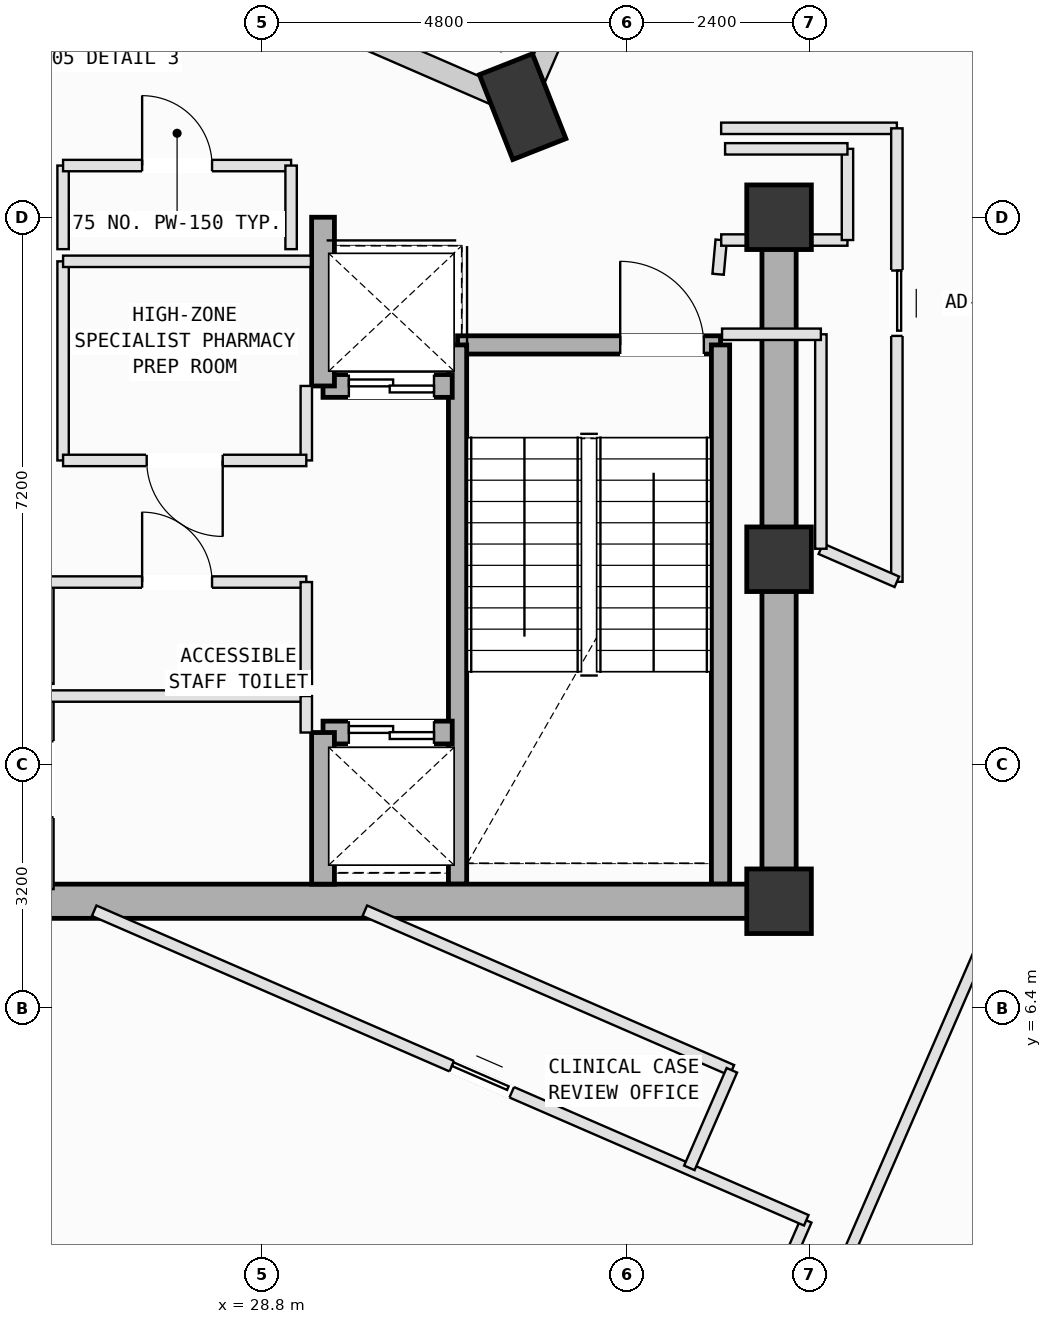
"""IFC4 building model, lengths in metres.
Left out: names, types, materials, properties, quantities, classifications, styles, units other than length and angle.
Written with IfcOpenShell. Run it as: python <this file> out.ifc"""

import sys

from ifc_helpers import new_model, si_unit, direction, frame, frame_2d, origin, origin_2d, place, context, subcontext, project, spatial, rectangle, extrude, element, fill, save


model = new_model("IFC4")
c1 = context("Model", 3, precision=1e-05, world=origin(), true_north=direction((0.0, 1.0)))
c2 = subcontext(c1, "Body", "Model", "MODEL_VIEW")
j1 = project(units=[si_unit("LENGTHUNIT", "METRE"), si_unit("PLANEANGLEUNIT", "RADIAN")], contexts=[c1])
p1 = place(None, origin())
s1 = spatial("IfcSite", under=j1, at=p1, CompositionType="ELEMENT")
p2 = place(p1, origin())
s2 = spatial("IfcBuilding", under=s1, at=p2, CompositionType="ELEMENT")
p3 = place(p2, frame((0.0, 0.0, 316.6)))
s3 = spatial("IfcBuildingStorey", under=s2, at=p3, CompositionType="ELEMENT", Elevation=316.6)
for number, where, z_axis, x_axis in (
    (1, (35.6, 7.8, 0.0), (0.0, 0.0, 1.0), (1.0, 0.0, 0.0)),
    (2, (35.6, 12.3, 0.0), (0.0, 0.0, 1.0), (1.0, 0.0, 0.0)),
    (3, (35.6, 16.8, 0.0), (0.0, 0.0, 1.0), (1.0, 0.0, 0.0)),
):
    element("IfcColumn", number, at=place(p3, frame(where, z_axis=z_axis, x_axis=x_axis)), inside=s3, PredefinedType="COLUMN", context=c2, shape_type="SweptSolid", body=[
        extrude(rectangle(XDim=0.85, YDim=0.85, at=origin_2d()), origin(), (0.0, 0.0, 1.0), 4.0),
    ])
p4 = place(p3, frame((32.226, 18.255, 0.002), z_axis=(0.0, 0.0, 1.0), x_axis=(-0.366501226724, 0.930417567982, 0.0)))
e4 = element("IfcColumn", 4, at=p4, inside=s3, PredefinedType="COLUMN", context=c2, shape_type="SweptSolid", body=[
    extrude(rectangle(XDim=1.2, YDim=0.75, at=origin_2d()), origin(), (0.0, 0.0, 1.0), 3.996),
])
p5 = place(p3, frame((32.385, 18.619, 0.0), z_axis=(0.0, 0.0, 1.0), x_axis=(0.398753668733, 0.917058074318, 0.0)))
e5 = element("IfcWall", 5, at=p5, inside=s3, PredefinedType="SOLIDWALL", context=c2, shape_type="SweptSolid", body=[
    extrude(rectangle(XDim=6.155, YDim=0.28, at=frame_2d((3.078, 0.0))), origin(), (0.0, 0.0, 1.0), 3.265),
])
p6 = place(p3, frame((25.484, 21.187, 0.0), z_axis=(0.0, 0.0, 1.0), x_axis=(0.917060568388, -0.398747932794, 0.0)))
e6 = element("IfcWall", 6, at=p6, inside=s3, PredefinedType="SOLIDWALL", context=c2, shape_type="SweptSolid", body=[
    extrude(rectangle(XDim=6.955, YDim=0.28, at=frame_2d((3.478, 0.0))), origin(), (0.0, 0.0, 1.0), 2.765),
])
p7 = place(p3, frame((31.37, 15.12, 0.0), z_axis=(0.0, 0.0, 1.0), x_axis=(1.0, 0.0, 0.0)))
e7 = element("IfcWall", 7, at=p7, inside=s3, PredefinedType="SOLIDWALL", context=c2, shape_type="SweptSolid", body=[
    extrude(rectangle(XDim=3.46, YDim=0.24, at=frame_2d((1.73, 0.0))), origin(), (0.0, 0.0, 1.0), 3.78),
])
p8 = place(p7, frame((2.14, 0.0, 0.0)))
e8 = element("IfcOpeningElement", 8, at=p8, cuts=e7, PredefinedType="OPENING", context=c2, shape_type="SweptSolid", body=[
    extrude(rectangle(XDim=1.1, YDim=2.15, at=frame_2d((0.55, 1.075))), frame((0.0, 0.13, 0.0), z_axis=(0.0, -1.0, 0.0), x_axis=(1.0, 0.0, 0.0)), (0.0, 0.0, 1.0), 0.26),
])
for number, where, z_axis, x_axis in (
    (9, (34.83, 15.12, 0.0), (0.0, 0.0, 1.0), (0.0, -1.0, 0.0)),
    (10, (31.37, 8.025, 0.0), (0.0, 0.0, 1.0), (0.0, 1.0, 0.0)),
):
    element("IfcWall", number, at=place(p3, frame(where, z_axis=z_axis, x_axis=x_axis)), inside=s3, PredefinedType="SOLIDWALL", context=c2, shape_type="SweptSolid", body=[
        extrude(rectangle(XDim=7.095, YDim=0.24, at=frame_2d((3.548, 0.0))), origin(), (0.0, 0.0, 1.0), 3.78),
    ])
p9 = place(p3, frame((24.8, 7.8, 0.0), z_axis=(0.0, 0.0, 1.0), x_axis=(1.0, 0.0, 0.0)))
e11 = element("IfcWall", 11, at=p9, inside=s3, PredefinedType="SHEAR", context=c2, shape_type="SweptSolid", body=[
    extrude(rectangle(XDim=10.8, YDim=0.45, at=frame_2d((5.4, 0.0))), origin(), (0.0, 0.0, 1.0), 3.78),
])
p10 = place(p3, frame((35.6, 7.8, 0.0), z_axis=(0.0, 0.0, 1.0), x_axis=(0.0, 1.0, 0.0)))
e12 = element("IfcWall", 12, at=p10, inside=s3, PredefinedType="SHEAR", context=c2, shape_type="SweptSolid", body=[
    extrude(rectangle(XDim=9.0, YDim=0.45, at=frame_2d((4.5, 0.0))), origin(), (0.0, 0.0, 1.0), 3.78),
])
p11 = place(p3, frame((29.6, 10.02, 0.0), z_axis=(0.0, 0.0, 1.0), x_axis=(1.0, 0.0, 0.0)))
e13 = element("IfcWall", 13, at=p11, inside=s3, PredefinedType="SOLIDWALL", context=c2, shape_type="SweptSolid", body=[
    extrude(rectangle(XDim=1.7, YDim=0.3, at=frame_2d((0.85, 0.0))), origin(), (0.0, 0.0, 1.0), 3.78),
])
p12 = place(p11, frame((0.34, 0.0, 0.0)))
e14 = element("IfcOpeningElement", 14, at=p12, cuts=e13, PredefinedType="OPENING", context=c2, shape_type="SweptSolid", body=[
    extrude(rectangle(XDim=1.12, YDim=2.15, at=frame_2d((0.56, 1.075))), frame((0.0, 0.16, 0.0), z_axis=(0.0, -1.0, 0.0), x_axis=(1.0, 0.0, 0.0)), (0.0, 0.0, 1.0), 0.32),
])
p13 = place(p3, frame((29.6, 8.025, 0.0), z_axis=(0.0, 0.0, 1.0), x_axis=(0.0, 1.0, 0.0)))
e15 = element("IfcWall", 15, at=p13, inside=s3, PredefinedType="SOLIDWALL", context=c2, shape_type="SweptSolid", body=[
    extrude(rectangle(XDim=1.995, YDim=0.3, at=frame_2d((0.998, 0.0))), origin(), (0.0, 0.0, 1.0), 3.78),
])
p14 = place(p3, frame((29.6, 14.58, 0.0), z_axis=(0.0, 0.0, 1.0), x_axis=(1.0, 0.0, 0.0)))
e16 = element("IfcWall", 16, at=p14, inside=s3, PredefinedType="SOLIDWALL", context=c2, shape_type="SweptSolid", body=[
    extrude(rectangle(XDim=1.7, YDim=0.3, at=frame_2d((0.85, 0.0))), origin(), (0.0, 0.0, 1.0), 3.78),
])
p15 = place(p14, frame((0.34, 0.0, 0.0)))
e17 = element("IfcOpeningElement", 17, at=p15, cuts=e16, PredefinedType="OPENING", context=c2, shape_type="SweptSolid", body=[
    extrude(rectangle(XDim=1.12, YDim=2.15, at=frame_2d((0.56, 1.075))), frame((0.0, 0.16, 0.0), z_axis=(0.0, -1.0, 0.0), x_axis=(1.0, 0.0, 0.0)), (0.0, 0.0, 1.0), 0.32),
])
p16 = place(p3, frame((29.6, 14.58, 0.0), z_axis=(0.0, 0.0, 1.0), x_axis=(0.0, 1.0, 0.0)))
e18 = element("IfcWall", 18, at=p16, inside=s3, PredefinedType="SOLIDWALL", context=c2, shape_type="SweptSolid", body=[
    extrude(rectangle(XDim=2.22, YDim=0.3, at=frame_2d((1.11, 0.0))), origin(), (0.0, 0.0, 1.0), 3.78),
])
p17 = place(p3, frame((25.98, 7.96, 0.0), z_axis=(0.0, 0.0, 1.0), x_axis=(0.0, 1.0, 0.0)))
e19 = element("IfcWall", 19, at=p17, inside=s3, PredefinedType="PARTITIONING", context=c2, shape_type="SweptSolid", body=[
    extrude(rectangle(XDim=2.54, YDim=0.15, at=frame_2d((1.27, 0.0))), origin(), (0.0, 0.0, 1.0), 3.78),
])
p18 = place(p17, frame((0.945, 0.0, 0.0)))
e20 = element("IfcOpeningElement", 20, at=p18, cuts=e19, PredefinedType="OPENING", context=c2, shape_type="SweptSolid", body=[
    extrude(rectangle(XDim=1.0, YDim=2.12, at=frame_2d((0.5, 1.06))), frame((0.0, 0.085, 0.0), z_axis=(0.0, -1.0, 0.0), x_axis=(1.0, 0.0, 0.0)), (0.0, 0.0, 1.0), 0.17),
])
p19 = place(p3, frame((25.98, 10.5, 0.0), z_axis=(0.0, 0.0, 1.0), x_axis=(1.0, 0.0, 0.0)))
e21 = element("IfcWall", 21, at=p19, inside=s3, PredefinedType="PARTITIONING", context=c2, shape_type="SweptSolid", body=[
    extrude(rectangle(XDim=3.4, YDim=0.15, at=frame_2d((1.7, 0.0))), origin(), (0.0, 0.0, 1.0), 3.78),
])
p20 = place(p3, frame((29.38, 10.5, 0.0), z_axis=(0.0, 0.0, 1.0), x_axis=(0.0, -1.0, 0.0)))
e22 = element("IfcWall", 22, at=p20, inside=s3, PredefinedType="PARTITIONING", context=c2, shape_type="SweptSolid", body=[
    extrude(rectangle(XDim=0.48, YDim=0.15, at=frame_2d((0.24, 0.0))), origin(), (0.0, 0.0, 1.0), 3.78),
])
p21 = place(p3, frame((25.98, 10.66, 0.0), z_axis=(0.0, 0.0, 1.0), x_axis=(0.0, 1.0, 0.0)))
e23 = element("IfcWall", 23, at=p21, inside=s3, PredefinedType="PARTITIONING", context=c2, shape_type="SweptSolid", body=[
    extrude(rectangle(XDim=1.34, YDim=0.15, at=frame_2d((0.67, 0.0))), origin(), (0.0, 0.0, 1.0), 3.78),
])
p22 = place(p3, frame((25.98, 12.0, 0.0), z_axis=(0.0, 0.0, 1.0), x_axis=(1.0, 0.0, 0.0)))
e24 = element("IfcWall", 24, at=p22, inside=s3, PredefinedType="PARTITIONING", context=c2, shape_type="SweptSolid", body=[
    extrude(rectangle(XDim=3.4, YDim=0.15, at=frame_2d((1.7, 0.0))), origin(), (0.0, 0.0, 1.0), 3.78),
])
p23 = place(p22, frame((1.24, 0.0, 0.0)))
e25 = element("IfcOpeningElement", 25, at=p23, cuts=e24, PredefinedType="OPENING", context=c2, shape_type="SweptSolid", body=[
    extrude(rectangle(XDim=0.92, YDim=2.1, at=frame_2d((0.46, 1.05))), frame((0.0, 0.085, 0.0), z_axis=(0.0, -1.0, 0.0), x_axis=(1.0, 0.0, 0.0)), (0.0, 0.0, 1.0), 0.17),
])
p24 = place(p3, frame((29.38, 12.0, 0.0), z_axis=(0.0, 0.0, 1.0), x_axis=(0.0, -1.0, 0.0)))
e26 = element("IfcWall", 26, at=p24, inside=s3, PredefinedType="PARTITIONING", context=c2, shape_type="SweptSolid", body=[
    extrude(rectangle(XDim=1.34, YDim=0.15, at=frame_2d((0.67, 0.0))), origin(), (0.0, 0.0, 1.0), 3.78),
])
p25 = place(p3, frame((26.18, 13.6, 0.0), z_axis=(0.0, 0.0, 1.0), x_axis=(0.0, 1.0, 0.0)))
e27 = element("IfcWall", 27, at=p25, inside=s3, PredefinedType="PARTITIONING", context=c2, shape_type="SweptSolid", body=[
    extrude(rectangle(XDim=2.62, YDim=0.15, at=frame_2d((1.31, 0.0))), origin(), (0.0, 0.0, 1.0), 3.78),
])
p26 = place(p3, frame((26.18, 16.22, 0.0), z_axis=(0.0, 0.0, 1.0), x_axis=(1.0, 0.0, 0.0)))
e28 = element("IfcWall", 28, at=p26, inside=s3, PredefinedType="PARTITIONING", context=c2, shape_type="SweptSolid", body=[
    extrude(rectangle(XDim=3.26, YDim=0.15, at=frame_2d((1.63, 0.0))), origin(), (0.0, 0.0, 1.0), 3.78),
])
p27 = place(p3, frame((29.38, 14.58, 0.0), z_axis=(0.0, 0.0, 1.0), x_axis=(0.0, -1.0, 0.0)))
e29 = element("IfcWall", 29, at=p27, inside=s3, PredefinedType="PARTITIONING", context=c2, shape_type="SweptSolid", body=[
    extrude(rectangle(XDim=0.98, YDim=0.15, at=frame_2d((0.49, 0.0))), origin(), (0.0, 0.0, 1.0), 3.78),
])
p28 = place(p3, frame((29.38, 13.6, 0.0), z_axis=(0.0, 0.0, 1.0), x_axis=(-1.0, 0.0, 0.0)))
e30 = element("IfcWall", 30, at=p28, inside=s3, PredefinedType="PARTITIONING", context=c2, shape_type="SweptSolid", body=[
    extrude(rectangle(XDim=3.2, YDim=0.15, at=frame_2d((1.6, 0.0))), origin(), (0.0, 0.0, 1.0), 3.78),
])
p29 = place(p28, frame((1.1, 0.0, 0.0)))
e31 = element("IfcOpeningElement", 31, at=p29, cuts=e30, PredefinedType="OPENING", context=c2, shape_type="SweptSolid", body=[
    extrude(rectangle(XDim=1.0, YDim=2.12, at=frame_2d((0.5, 1.06))), frame((0.0, 0.085, 0.0), z_axis=(0.0, -1.0, 0.0), x_axis=(1.0, 0.0, 0.0)), (0.0, 0.0, 1.0), 0.17),
])
p30 = place(p3, frame((26.18, 16.38, 0.0), z_axis=(0.0, 0.0, 1.0), x_axis=(0.0, 1.0, 0.0)))
e32 = element("IfcWall", 32, at=p30, inside=s3, PredefinedType="PARTITIONING", context=c2, shape_type="SweptSolid", body=[
    extrude(rectangle(XDim=1.1, YDim=0.15, at=frame_2d((0.55, 0.0))), origin(), (0.0, 0.0, 1.0), 3.78),
])
p31 = place(p3, frame((26.18, 17.48, 0.0), z_axis=(0.0, 0.0, 1.0), x_axis=(1.0, 0.0, 0.0)))
e33 = element("IfcWall", 33, at=p31, inside=s3, PredefinedType="PARTITIONING", context=c2, shape_type="SweptSolid", body=[
    extrude(rectangle(XDim=3.0, YDim=0.15, at=frame_2d((1.5, 0.0))), origin(), (0.0, 0.0, 1.0), 3.78),
])
p32 = place(p31, frame((1.04, 0.0, 0.0)))
e34 = element("IfcOpeningElement", 34, at=p32, cuts=e33, PredefinedType="OPENING", context=c2, shape_type="SweptSolid", body=[
    extrude(rectangle(XDim=0.92, YDim=2.1, at=frame_2d((0.46, 1.05))), frame((0.0, 0.085, 0.0), z_axis=(0.0, -1.0, 0.0), x_axis=(1.0, 0.0, 0.0)), (0.0, 0.0, 1.0), 0.17),
])
p33 = place(p3, frame((29.18, 17.48, 0.0), z_axis=(0.0, 0.0, 1.0), x_axis=(0.0, -1.0, 0.0)))
e35 = element("IfcWall", 35, at=p33, inside=s3, PredefinedType="PARTITIONING", context=c2, shape_type="SweptSolid", body=[
    extrude(rectangle(XDim=1.1, YDim=0.15, at=frame_2d((0.55, 0.0))), origin(), (0.0, 0.0, 1.0), 3.78),
])
p34 = place(p3, frame((33.286, -4.26, 0.0), z_axis=(0.0, 0.0, 1.0), x_axis=(0.398794571869, 0.9170402878, 0.0)))
e36 = element("IfcWall", 36, at=p34, inside=s3, PredefinedType="PARTITIONING", context=c2, shape_type="SweptSolid", body=[
    extrude(rectangle(XDim=13.04, YDim=0.15, at=frame_2d((6.52, 0.0))), origin(), (0.0, 0.0, 1.0), 2.765),
])
p35 = place(p3, frame((35.958, 3.602, 0.0), z_axis=(0.0, 0.0, 1.0), x_axis=(-0.398756424957, -0.917056875857, 0.0)))
e37 = element("IfcWall", 37, at=p35, inside=s3, PredefinedType="PARTITIONING", context=c2, shape_type="SweptSolid", body=[
    extrude(rectangle(XDim=8.835, YDim=0.15, at=frame_2d((4.417, 0.0))), origin(), (0.0, 0.0, 1.0), 2.765),
])
p36 = place(p3, frame((26.589, 7.675, 0.0), z_axis=(0.0, 0.0, 1.0), x_axis=(0.917085632944, -0.398690283112, 0.0)))
e38 = element("IfcWall", 38, at=p36, inside=s3, PredefinedType="PARTITIONING", context=c2, shape_type="SweptSolid", body=[
    extrude(rectangle(XDim=10.216, YDim=0.15, at=frame_2d((5.108, 0.0))), origin(), (0.0, 0.0, 1.0), 3.78),
])
p37 = place(p36, frame((5.131, 0.0, 0.0)))
e39 = element("IfcOpeningElement", 39, at=p37, cuts=e38, PredefinedType="OPENING", context=c2, shape_type="SweptSolid", body=[
    extrude(rectangle(XDim=0.86, YDim=2.06, at=frame_2d((0.43, 1.03))), frame((0.0, 0.085, 0.0), z_axis=(0.0, -1.0, 0.0), x_axis=(1.0, 0.0, 0.0)), (0.0, 0.0, 1.0), 0.17),
])
p38 = place(p3, frame((30.15, 7.675, 0.0), z_axis=(0.0, 0.0, 1.0), x_axis=(0.917103960726, -0.398648122059, 0.0)))
e40 = element("IfcWall", 40, at=p38, inside=s3, PredefinedType="PARTITIONING", context=c2, shape_type="SweptSolid", body=[
    extrude(rectangle(XDim=5.266, YDim=0.15, at=frame_2d((2.633, 0.0))), origin(), (0.0, 0.0, 1.0), 3.78),
])
p39 = place(p3, frame((34.979, 5.576, 0.0), z_axis=(0.0, 0.0, 1.0), x_axis=(-0.399236039494, -0.916848179782, 0.0)))
e41 = element("IfcWall", 41, at=p39, inside=s3, PredefinedType="PARTITIONING", context=c2, shape_type="SweptSolid", body=[
    extrude(rectangle(XDim=1.4, YDim=0.15, at=frame_2d((0.7, 0.0))), origin(), (0.0, 0.0, 1.0), 3.78),
])
p40 = place(p3, frame((34.798, 16.05, 0.0), z_axis=(0.0, 0.0, 1.0), x_axis=(0.090779345207, 0.99587103105, 0.0)))
e42 = element("IfcWall", 42, at=p40, inside=s3, PredefinedType="PARTITIONING", context=c2, shape_type="SweptSolid", body=[
    extrude(rectangle(XDim=0.452, YDim=0.15, at=frame_2d((0.226, 0.0))), origin(), (0.0, 0.0, 1.0), 3.78),
])
p41 = place(p3, frame((34.839, 16.5, 0.0), z_axis=(0.0, 0.0, 1.0), x_axis=(1.0, 0.0, 0.0)))
e43 = element("IfcWall", 43, at=p41, inside=s3, PredefinedType="PARTITIONING", context=c2, shape_type="SweptSolid", body=[
    extrude(rectangle(XDim=1.661, YDim=0.15, at=frame_2d((0.831, 0.0))), origin(), (0.0, 0.0, 1.0), 2.765),
])
p42 = place(p3, frame((36.5, 16.5, 0.0), z_axis=(0.0, 0.0, 1.0), x_axis=(0.0, 1.0, 0.0)))
e44 = element("IfcWall", 44, at=p42, inside=s3, PredefinedType="PARTITIONING", context=c2, shape_type="SweptSolid", body=[
    extrude(rectangle(XDim=1.2, YDim=0.15, at=frame_2d((0.6, 0.0))), origin(), (0.0, 0.0, 1.0), 3.78),
])
p43 = place(p3, frame((36.5, 17.7, 0.0), z_axis=(0.0, 0.0, 1.0), x_axis=(-1.0, 0.0, 0.0)))
e45 = element("IfcWall", 45, at=p43, inside=s3, PredefinedType="PARTITIONING", context=c2, shape_type="SweptSolid", body=[
    extrude(rectangle(XDim=1.61, YDim=0.15, at=frame_2d((0.805, 0.0))), origin(), (0.0, 0.0, 1.0), 3.78),
])
p44 = place(p3, frame((34.838, 17.97, 0.0), z_axis=(0.0, 0.0, 1.0), x_axis=(1.0, 0.0, 0.0)))
e46 = element("IfcWall", 46, at=p44, inside=s3, PredefinedType="PARTITIONING", context=c2, shape_type="SweptSolid", body=[
    extrude(rectangle(XDim=2.312, YDim=0.15, at=frame_2d((1.156, 0.0))), origin(), (0.0, 0.0, 1.0), 3.78),
])
p45 = place(p3, frame((37.15, 17.97, 0.0), z_axis=(0.0, 0.0, 1.0), x_axis=(0.0, -1.0, 0.0)))
e47 = element("IfcWall", 47, at=p45, inside=s3, PredefinedType="PARTITIONING", context=c2, shape_type="SweptSolid", body=[
    extrude(rectangle(XDim=5.967, YDim=0.15, at=frame_2d((2.983, 0.0))), origin(), (0.0, 0.0, 1.0), 3.78),
])
p46 = place(p45, frame((1.871, 0.0, 0.0)))
e48 = element("IfcOpeningElement", 48, at=p46, cuts=e47, PredefinedType="OPENING", context=c2, shape_type="SweptSolid", body=[
    extrude(rectangle(XDim=0.86, YDim=2.06, at=frame_2d((0.43, 1.03))), frame((0.0, 0.085, 0.0), z_axis=(0.0, -1.0, 0.0), x_axis=(1.0, 0.0, 0.0)), (0.0, 0.0, 1.0), 0.17),
])
p47 = place(p3, frame((37.15, 12.003, 0.0), z_axis=(0.0, 0.0, 1.0), x_axis=(-0.916977493273, 0.398938938724, 0.0)))
e49 = element("IfcWall", 49, at=p47, inside=s3, PredefinedType="PARTITIONING", context=c2, shape_type="SweptSolid", body=[
    extrude(rectangle(XDim=1.091, YDim=0.15, at=frame_2d((0.545, 0.0))), origin(), (0.0, 0.0, 1.0), 3.78),
])
p48 = place(p3, frame((36.15, 12.438, 0.0), z_axis=(0.0, 0.0, 1.0), x_axis=(0.0, 1.0, 0.0)))
e50 = element("IfcWall", 50, at=p48, inside=s3, PredefinedType="PARTITIONING", context=c2, shape_type="SweptSolid", body=[
    extrude(rectangle(XDim=2.822, YDim=0.15, at=frame_2d((1.411, 0.0))), origin(), (0.0, 0.0, 1.0), 3.78),
])
p49 = place(p3, frame((36.15, 15.26, 0.0), z_axis=(0.0, 0.0, 1.0), x_axis=(-1.0, 0.0, 0.0)))
e51 = element("IfcWall", 51, at=p49, inside=s3, PredefinedType="PARTITIONING", context=c2, shape_type="SweptSolid", body=[
    extrude(rectangle(XDim=1.3, YDim=0.15, at=frame_2d((0.65, 0.0))), origin(), (0.0, 0.0, 1.0), 3.78),
])
p50 = place(p8, origin())
e52 = element("IfcDoor", 52, at=p50, inside=s3, OperationType="SINGLE_SWING_LEFT", PredefinedType="DOOR", context=c2, shape_type="SweptSolid", body=[
    extrude(rectangle(XDim=1.1, YDim=2.15, at=frame_2d((0.55, 1.075))), frame((0.0, 0.025, 0.0), z_axis=(0.0, -1.0, 0.0), x_axis=(1.0, 0.0, 0.0)), (0.0, 0.0, 1.0), 0.05),
])
fill(e8, e52)
p51 = place(p12, origin())
e53 = element("IfcDoor", 53, at=p51, inside=s3, OperationType="DOUBLE_DOOR_SLIDING", PredefinedType="DOOR", context=c2, shape_type="SweptSolid", body=[
    extrude(rectangle(XDim=1.12, YDim=2.15, at=frame_2d((0.56, 1.075))), frame((0.0, 0.025, 0.0), z_axis=(0.0, -1.0, 0.0), x_axis=(1.0, 0.0, 0.0)), (0.0, 0.0, 1.0), 0.05),
])
fill(e14, e53)
p52 = place(p15, origin())
e54 = element("IfcDoor", 54, at=p52, inside=s3, OperationType="DOUBLE_DOOR_SLIDING", PredefinedType="DOOR", context=c2, shape_type="SweptSolid", body=[
    extrude(rectangle(XDim=1.12, YDim=2.15, at=frame_2d((0.56, 1.075))), frame((0.0, 0.025, 0.0), z_axis=(0.0, -1.0, 0.0), x_axis=(1.0, 0.0, 0.0)), (0.0, 0.0, 1.0), 0.05),
])
fill(e17, e54)
p53 = place(p23, origin())
e55 = element("IfcDoor", 55, at=p53, inside=s3, OperationType="SINGLE_SWING_LEFT", PredefinedType="DOOR", context=c2, shape_type="SweptSolid", body=[
    extrude(rectangle(XDim=0.92, YDim=2.1, at=frame_2d((0.46, 1.05))), frame((0.0, 0.025, 0.0), z_axis=(0.0, -1.0, 0.0), x_axis=(1.0, 0.0, 0.0)), (0.0, 0.0, 1.0), 0.05),
])
fill(e25, e55)
p54 = place(p29, origin())
e56 = element("IfcDoor", 56, at=p54, inside=s3, OperationType="SINGLE_SWING_LEFT", PredefinedType="DOOR", context=c2, shape_type="SweptSolid", body=[
    extrude(rectangle(XDim=1.0, YDim=2.12, at=frame_2d((0.5, 1.06))), frame((0.0, 0.025, 0.0), z_axis=(0.0, -1.0, 0.0), x_axis=(1.0, 0.0, 0.0)), (0.0, 0.0, 1.0), 0.05),
])
fill(e31, e56)
p55 = place(p32, origin())
e57 = element("IfcDoor", 57, at=p55, inside=s3, OperationType="SINGLE_SWING_LEFT", PredefinedType="DOOR", context=c2, shape_type="SweptSolid", body=[
    extrude(rectangle(XDim=0.92, YDim=2.1, at=frame_2d((0.46, 1.05))), frame((0.0, 0.025, 0.0), z_axis=(0.0, -1.0, 0.0), x_axis=(1.0, 0.0, 0.0)), (0.0, 0.0, 1.0), 0.05),
])
fill(e34, e57)
p56 = place(p46, origin())
e58 = element("IfcDoor", 58, at=p56, inside=s3, OperationType="SLIDING_TO_LEFT", PredefinedType="DOOR", context=c2, shape_type="SweptSolid", body=[
    extrude(rectangle(XDim=0.86, YDim=2.06, at=frame_2d((0.43, 1.03))), frame((0.0, 0.025, 0.0), z_axis=(0.0, -1.0, 0.0), x_axis=(1.0, 0.0, 0.0)), (0.0, 0.0, 1.0), 0.05),
])
fill(e48, e58)
p57 = place(p37, origin())
e59 = element("IfcDoor", 59, at=p57, inside=s3, OperationType="SLIDING_TO_LEFT", PredefinedType="DOOR", context=c2, shape_type="SweptSolid", body=[
    extrude(rectangle(XDim=0.86, YDim=2.06, at=frame_2d((0.43, 1.03))), frame((0.0, 0.025, 0.0), z_axis=(0.0, -1.0, 0.0), x_axis=(1.0, 0.0, 0.0)), (0.0, 0.0, 1.0), 0.05),
])
fill(e39, e59)
save(model, sys.argv[1])
